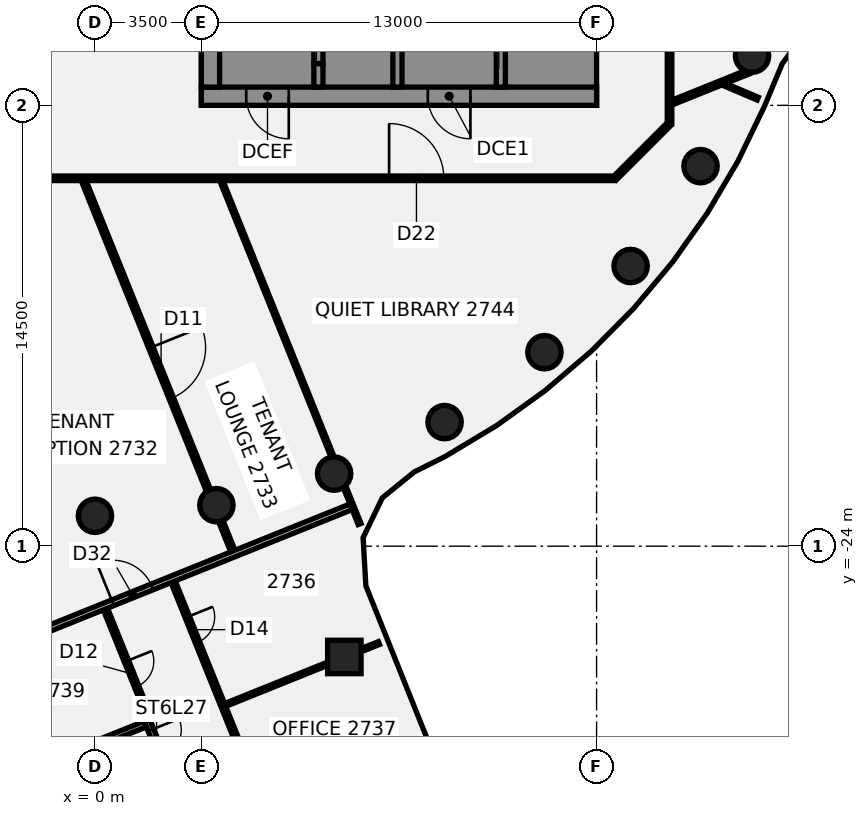
"""IFC4 building model, lengths in metres.
Left out: names, types, materials, properties, quantities, classifications, styles, units other than length and angle.
Written with IfcOpenShell. Run it as: python <this file> out.ifc"""

import sys

from ifc_helpers import new_model, si_unit, direction, frame, frame_2d, origin, origin_2d, place, context, subcontext, project, spatial, polyline, rectangle, circle, outline, extrude, element, fill, save


model = new_model("IFC4")
c1 = context("Model", 3, precision=1e-05, world=origin(), true_north=direction((0.0, 1.0)))
c2 = subcontext(c1, "Body", "Model", "MODEL_VIEW")
j1 = project(units=[si_unit("LENGTHUNIT", "METRE"), si_unit("PLANEANGLEUNIT", "RADIAN")], contexts=[c1])
p1 = place(None, origin())
s1 = spatial("IfcSite", under=j1, at=p1, CompositionType="ELEMENT")
p2 = place(p1, origin())
s2 = spatial("IfcBuilding", under=s1, at=p2, CompositionType="ELEMENT")
p3 = place(p2, frame((0.0, 0.0, 113.5)))
s3 = spatial("IfcBuildingStorey", under=s2, at=p3, CompositionType="ELEMENT", Elevation=113.5)
for number, where, z_axis, x_axis in (
    (1, (0.0, -23.0, -0.14), (0.0, 0.0, 1.0), (1.0, 0.0, 0.0)),
    (2, (3.994, -22.651, -0.14), (0.0, 0.0, 1.0), (1.0, 0.0, 0.0)),
    (3, (7.866, -21.613, -0.14), (0.0, 0.0, 1.0), (1.0, 0.0, 0.0)),
    (4, (11.5, -19.919, -0.14), (0.0, 0.0, 1.0), (1.0, 0.0, 0.0)),
    (5, (14.784, -17.619, -0.14), (0.0, 0.0, 1.0), (1.0, 0.0, 0.0)),
    (6, (17.619, -14.784, -0.14), (0.0, 0.0, 1.0), (1.0, 0.0, 0.0)),
    (7, (19.919, -11.5, -0.14), (0.0, 0.0, 1.0), (1.0, 0.0, 0.0)),
    (8, (21.613, -7.866, -0.14), (0.0, 0.0, 1.0), (1.0, 0.0, 0.0)),
):
    element("IfcColumn", number, at=place(p3, frame(where, z_axis=z_axis, x_axis=x_axis)), inside=s3, PredefinedType="COLUMN", context=c2, shape_type="SweptSolid", body=[
        extrude(circle(Radius=0.55, at=origin_2d()), origin(), (0.0, 0.0, 1.0), 3.75),
    ])
p4 = place(p3, frame((8.203, -27.644, -0.139), z_axis=(0.027071017843, 0.040085930267, 0.998829454005), x_axis=(-0.927195791465, -0.372426997279, 0.040076127407)))
e9 = element("IfcColumn", 9, at=p4, inside=s3, PredefinedType="COLUMN", context=c2, shape_type="SweptSolid", body=[
    extrude(rectangle(XDim=1.1, YDim=1.1, at=origin_2d()), origin(), (0.0, 0.0, 1.0), 3.752),
])
p5 = place(p3, frame((-0.369, -11.983, 0.0), z_axis=(0.0, 0.0, 1.0), x_axis=(0.373668275566, -0.927562407515, 0.0)))
e10 = element("IfcWall", 10, at=p5, inside=s3, PredefinedType="PARTITIONING", context=c2, shape_type="SweptSolid", body=[
    extrude(rectangle(XDim=10.973, YDim=0.15, at=frame_2d((5.486, 0.0))), origin(), (0.0, 0.0, 1.0), 3.01),
])
p6 = place(p5, frame((5.91, 0.0, 0.0)))
e11 = element("IfcOpeningElement", 11, at=p6, cuts=e10, PredefinedType="OPENING", context=c2, shape_type="SweptSolid", body=[
    extrude(rectangle(XDim=1.8, YDim=2.1, at=frame_2d((0.9, 1.05))), frame((0.0, 0.085, 0.0), z_axis=(0.0, -1.0, 0.0), x_axis=(1.0, 0.0, 0.0)), (0.0, 0.0, 1.0), 0.17),
])
p7 = place(p3, frame((4.138, -23.172, 0.0), z_axis=(0.0, 0.0, 1.0), x_axis=(0.373599900648, -0.927589949404, 0.0)))
e12 = element("IfcWall", 12, at=p7, inside=s3, PredefinedType="PARTITIONING", context=c2, shape_type="SweptSolid", body=[
    extrude(rectangle(XDim=1.066, YDim=0.15, at=frame_2d((0.533, 0.0))), origin(), (0.0, 0.0, 1.0), 3.01),
])
p8 = place(p3, frame((0.344, -26.066, 0.0), z_axis=(0.0, 0.0, 1.0), x_axis=(0.373690194782, -0.927553577064, 0.0)))
e13 = element("IfcWall", 13, at=p8, inside=s3, PredefinedType="PARTITIONING", context=c2, shape_type="SweptSolid", body=[
    extrude(rectangle(XDim=3.861, YDim=0.15, at=frame_2d((1.93, 0.0))), origin(), (0.0, 0.0, 1.0), 3.01),
])
p9 = place(p8, frame((1.85, 0.0, 0.0)))
e14 = element("IfcOpeningElement", 14, at=p9, cuts=e13, PredefinedType="OPENING", context=c2, shape_type="SweptSolid", body=[
    extrude(rectangle(XDim=0.9, YDim=2.1, at=frame_2d((0.45, 1.05))), frame((0.0, 0.085, 0.0), z_axis=(0.0, -1.0, 0.0), x_axis=(1.0, 0.0, 0.0)), (0.0, 0.0, 1.0), 0.17),
])
p10 = place(p3, frame((2.572, -25.173, 0.0), z_axis=(0.0, 0.0, 1.0), x_axis=(0.373605584832, -0.927587659999, 0.0)))
e15 = element("IfcWall", 15, at=p10, inside=s3, PredefinedType="PARTITIONING", context=c2, shape_type="SweptSolid", body=[
    extrude(rectangle(XDim=13.316, YDim=0.15, at=frame_2d((6.658, 0.0))), origin(), (0.0, 0.0, 1.0), 3.01),
])
p11 = place(p10, frame((1.245, 0.0, 0.0)))
e16 = element("IfcOpeningElement", 16, at=p11, cuts=e15, PredefinedType="OPENING", context=c2, shape_type="SweptSolid", body=[
    extrude(rectangle(XDim=0.9, YDim=2.1, at=frame_2d((0.45, 1.05))), frame((0.0, 0.085, 0.0), z_axis=(0.0, -1.0, 0.0), x_axis=(1.0, 0.0, 0.0)), (0.0, 0.0, 1.0), 0.17),
])
p12 = place(p10, frame((6.795, 0.0, 0.0)))
e17 = element("IfcOpeningElement", 17, at=p12, cuts=e15, PredefinedType="OPENING", context=c2, shape_type="SweptSolid", body=[
    extrude(rectangle(XDim=0.9, YDim=2.1, at=frame_2d((0.45, 1.05))), frame((0.0, 0.085, 0.0), z_axis=(0.0, -1.0, 0.0), x_axis=(1.0, 0.0, 0.0)), (0.0, 0.0, 1.0), 0.17),
])
p13 = place(p10, frame((10.096, 0.0, 0.0)))
e18 = element("IfcOpeningElement", 18, at=p13, cuts=e15, PredefinedType="OPENING", context=c2, shape_type="SweptSolid", body=[
    extrude(rectangle(XDim=0.9, YDim=2.1, at=frame_2d((0.45, 1.05))), frame((0.0, 0.085, 0.0), z_axis=(0.0, -1.0, 0.0), x_axis=(1.0, 0.0, 0.0)), (0.0, 0.0, 1.0), 0.17),
])
p14 = place(p3, frame((4.155, -11.974, 0.0), z_axis=(0.0, 0.0, 1.0), x_axis=(0.373614117472, -0.927584223252, 0.0)))
e19 = element("IfcWall", 19, at=p14, inside=s3, PredefinedType="PARTITIONING", context=c2, shape_type="SweptSolid", body=[
    extrude(rectangle(XDim=9.802, YDim=0.1, at=frame_2d((4.901, 0.0))), origin(), (0.0, 0.0, 1.0), 3.01),
])
p15 = place(p3, frame((8.208, -22.037, 0.0), z_axis=(0.0, 0.0, 1.0), x_axis=(0.373637172646, -0.927574936712, 0.0)))
e20 = element("IfcWall", 20, at=p15, inside=s3, PredefinedType="PARTITIONING", context=c2, shape_type="SweptSolid", body=[
    extrude(rectangle(XDim=1.33, YDim=0.1, at=frame_2d((0.665, 0.0))), origin(), (0.0, 0.0, 1.0), 3.01),
])
p16 = place(p3, frame((20.71, -8.816, 0.0), z_axis=(0.0, 0.0, 1.0), x_axis=(0.919900111119, -0.392152757944, 0.0)))
e21 = element("IfcWall", 21, at=p16, inside=s3, PredefinedType="PARTITIONING", context=c2, shape_type="SweptSolid", body=[
    extrude(rectangle(XDim=1.185, YDim=0.1, at=frame_2d((0.592, 0.0))), origin(), (0.0, 0.0, 1.0), 3.01),
])
p17 = place(p3, frame((-17.1, -11.9, 0.0), z_axis=(0.0, 0.0, 1.0), x_axis=(1.0, 0.0, 0.0)))
e22 = element("IfcWall", 22, at=p17, inside=s3, PredefinedType="PARTITIONING", context=c2, shape_type="SweptSolid", body=[
    extrude(rectangle(XDim=34.165, YDim=0.15, at=frame_2d((17.083, 0.0))), origin(), (0.0, 0.0, 1.0), 3.01),
])
p18 = place(p17, frame((12.066, 0.0, 0.0)))
e23 = element("IfcOpeningElement", 23, at=p18, cuts=e22, PredefinedType="OPENING", context=c2, shape_type="SweptSolid", body=[
    extrude(rectangle(XDim=1.8, YDim=2.1, at=frame_2d((0.9, 1.05))), frame((0.0, 0.085, 0.0), z_axis=(0.0, -1.0, 0.0), x_axis=(1.0, 0.0, 0.0)), (0.0, 0.0, 1.0), 0.17),
])
p19 = place(p17, frame((2.1, 0.0, 0.0)))
e24 = element("IfcOpeningElement", 24, at=p19, cuts=e22, PredefinedType="OPENING", context=c2, shape_type="SweptSolid", body=[
    extrude(rectangle(XDim=1.8, YDim=2.1, at=frame_2d((0.9, 1.05))), frame((0.0, 0.085, 0.0), z_axis=(0.0, -1.0, 0.0), x_axis=(1.0, 0.0, 0.0)), (0.0, 0.0, 1.0), 0.17),
])
p20 = place(p17, frame((26.775, 0.0, 0.0)))
e25 = element("IfcOpeningElement", 25, at=p20, cuts=e22, PredefinedType="OPENING", context=c2, shape_type="SweptSolid", body=[
    extrude(rectangle(XDim=1.8, YDim=2.1, at=frame_2d((0.9, 1.05))), frame((0.0, 0.085, 0.0), z_axis=(0.0, -1.0, 0.0), x_axis=(1.0, 0.0, 0.0)), (0.0, 0.0, 1.0), 0.17),
])
p21 = place(p3, frame((-4.794, -28.028, 0.0), z_axis=(0.0, 0.0, 1.0), x_axis=(0.927584222455, 0.373614119451, 0.0)))
e26 = element("IfcWall", 26, at=p21, inside=s3, PredefinedType="PARTITIONING", context=c2, shape_type="SweptSolid", body=[
    extrude(rectangle(XDim=14.249, YDim=0.2, at=frame_2d((7.124, 0.0))), origin(), (0.0, 0.0, 1.0), 3.01),
])
p22 = place(p21, frame((5.799, 0.0, 0.0)))
e27 = element("IfcOpeningElement", 27, at=p22, cuts=e26, PredefinedType="OPENING", context=c2, shape_type="SweptSolid", body=[
    extrude(rectangle(XDim=1.4, YDim=2.1, at=frame_2d((0.7, 1.05))), frame((0.0, 0.11, 0.0), z_axis=(0.0, -1.0, 0.0), x_axis=(1.0, 0.0, 0.0)), (0.0, 0.0, 1.0), 0.22),
])
p23 = place(p3, frame((4.288, -29.22, 0.0), z_axis=(0.0, 0.0, 1.0), x_axis=(0.92759458759, 0.373588384553, 0.0)))
e28 = element("IfcWall", 28, at=p23, inside=s3, PredefinedType="PARTITIONING", context=c2, shape_type="SweptSolid", body=[
    extrude(rectangle(XDim=3.637, YDim=0.1, at=frame_2d((1.819, 0.0))), origin(), (0.0, 0.0, 1.0), 3.01),
])
p24 = place(p3, frame((8.872, -27.375, 0.0), z_axis=(0.0, 0.0, 1.0), x_axis=(0.927441472032, 0.373968335497, 0.0)))
e29 = element("IfcWall", 29, at=p24, inside=s3, PredefinedType="PARTITIONING", context=c2, shape_type="SweptSolid", body=[
    extrude(rectangle(XDim=0.506, YDim=0.1, at=frame_2d((0.253, 0.0))), origin(), (0.0, 0.0, 1.0), 3.01),
])
p25 = place(p3, frame((18.983, -9.408, 0.0), z_axis=(0.0, 0.0, 1.0), x_axis=(0.927604613821, 0.373563489139, 0.0)))
e30 = element("IfcWall", 30, at=p25, inside=s3, PredefinedType="PARTITIONING", context=c2, shape_type="SweptSolid", body=[
    extrude(rectangle(XDim=2.711, YDim=0.15, at=frame_2d((1.355, 0.0))), origin(), (0.0, 0.0, 1.0), 3.01),
])
p26 = place(p3, frame((17.1, -11.9, 0.0), z_axis=(0.0, 0.0, 1.0), x_axis=(0.707106781187, 0.707106781187, 0.0)))
e31 = element("IfcWall", 31, at=p26, inside=s3, PredefinedType="PARTITIONING", context=c2, shape_type="SweptSolid", body=[
    extrude(rectangle(XDim=2.505, YDim=0.15, at=frame_2d((1.253, 0.0))), origin(), (0.0, 0.0, 1.0), 3.01),
])
p27 = place(p3, frame((18.9, -10.1, 0.0), z_axis=(0.0, 0.0, 1.0), x_axis=(0.0, 1.0, 0.0)))
e32 = element("IfcWall", 32, at=p27, inside=s3, PredefinedType="PARTITIONING", context=c2, shape_type="SweptSolid", body=[
    extrude(rectangle(XDim=20.2, YDim=0.15, at=frame_2d((10.1, 0.0))), origin(), (0.0, 0.0, 1.0), 3.01),
])
p28 = place(p27, frame((8.786, 0.0, 0.0)))
e33 = element("IfcOpeningElement", 33, at=p28, cuts=e32, PredefinedType="OPENING", context=c2, shape_type="SweptSolid", body=[
    extrude(rectangle(XDim=1.8, YDim=2.1, at=frame_2d((0.9, 1.05))), frame((0.0, 0.085, 0.0), z_axis=(0.0, -1.0, 0.0), x_axis=(1.0, 0.0, 0.0)), (0.0, 0.0, 1.0), 0.17),
])
p29 = place(p27, frame((13.717, 0.0, 0.0)))
e34 = element("IfcOpeningElement", 34, at=p29, cuts=e32, PredefinedType="OPENING", context=c2, shape_type="SweptSolid", body=[
    extrude(rectangle(XDim=0.9, YDim=2.1, at=frame_2d((0.45, 1.05))), frame((0.0, 0.085, 0.0), z_axis=(0.0, -1.0, 0.0), x_axis=(1.0, 0.0, 0.0)), (0.0, 0.0, 1.0), 0.17),
])
p30 = place(p3, frame((16.5, -9.2, 0.0), z_axis=(0.0, 0.0, 1.0), x_axis=(-1.0, 0.0, 0.0)))
e35 = element("IfcWall", 35, at=p30, inside=s3, PredefinedType="SHEAR", context=c2, shape_type="SweptSolid", body=[
    extrude(rectangle(XDim=13.0, YDim=0.6, at=frame_2d((6.5, 0.0))), origin(), (0.0, 0.0, 1.0), 3.61),
])
p31 = place(p30, frame((4.15, 0.0, 0.0)))
e36 = element("IfcOpeningElement", 36, at=p31, cuts=e35, PredefinedType="OPENING", context=c2, shape_type="SweptSolid", body=[
    extrude(rectangle(XDim=1.4, YDim=2.1, at=frame_2d((0.7, 1.05))), frame((0.0, 0.31, 0.0), z_axis=(0.0, -1.0, 0.0), x_axis=(1.0, 0.0, 0.0)), (0.0, 0.0, 1.0), 0.62),
])
p32 = place(p30, frame((10.125, 0.0, 0.0)))
e37 = element("IfcOpeningElement", 37, at=p32, cuts=e35, PredefinedType="OPENING", context=c2, shape_type="SweptSolid", body=[
    extrude(rectangle(XDim=1.4, YDim=2.1, at=frame_2d((0.7, 1.05))), frame((0.0, 0.31, 0.0), z_axis=(0.0, -1.0, 0.0), x_axis=(1.0, 0.0, 0.0)), (0.0, 0.0, 1.0), 0.62),
])
p33 = place(p3, origin())
e38 = element("IfcWall", 38, at=p33, inside=s3, PredefinedType="SHEAR", context=c2, shape_type="SweptSolid", body=[
    extrude(outline(polyline([(13.5, -8.9), (15.9, -8.9), (16.5, -8.9), (16.5, 8.9), (15.9, 8.9), (13.5, 8.9), (13.5, 8.125), (15.9, 8.125), (15.9, 5.625), (13.5, 5.625), (13.5, 5.375), (15.9, 5.375), (15.9, 2.875), (13.5, 2.875), (13.5, 2.625), (15.9, 2.625), (15.9, 0.125), (13.5, 0.125), (13.5, -0.125), (15.9, -0.125), (15.9, -2.625), (13.5, -2.625), (13.5, -2.875), (15.9, -2.875), (15.9, -5.375), (13.5, -5.375), (13.5, -5.625), (15.9, -5.625), (15.9, -8.125), (13.5, -8.125), (13.5, -8.9)])), origin(), (0.0, 0.0, 1.0), 3.61),
])
p34 = place(p3, origin())
e39 = element("IfcWall", 39, at=p34, inside=s3, PredefinedType="SHEAR", context=c2, shape_type="SweptSolid", body=[
    extrude(outline(polyline([(7.5, -8.125), (7.5, -8.9), (9.8, -8.9), (9.8, -8.125), (9.8, -5.625), (9.55, -5.625), (9.55, -8.125), (7.5, -8.125)])), origin(), (0.0, 0.0, 1.0), 3.61),
])
p35 = place(p3, frame((7.35, -8.9, 0.0), z_axis=(0.0, 0.0, 1.0), x_axis=(0.0, 1.0, 0.0)))
e40 = element("IfcWall", 40, at=p35, inside=s3, PredefinedType="SHEAR", context=c2, shape_type="SweptSolid", body=[
    extrude(rectangle(XDim=0.775, YDim=0.3, at=frame_2d((0.387, 0.0))), origin(), (0.0, 0.0, 1.0), 3.61),
])
p36 = place(p3, frame((13.35, -8.9, 0.0), z_axis=(0.0, 0.0, 1.0), x_axis=(0.0, 1.0, 0.0)))
e41 = element("IfcWall", 41, at=p36, inside=s3, PredefinedType="SHEAR", context=c2, shape_type="SweptSolid", body=[
    extrude(rectangle(XDim=17.8, YDim=0.3, at=frame_2d((8.9, 0.0))), origin(), (0.0, 0.0, 1.0), 3.61),
])
p37 = place(p36, frame((1.325, 0.0, 0.0)))
e42 = element("IfcOpeningElement", 42, at=p37, cuts=e41, PredefinedType="OPENING", context=c2, shape_type="SweptSolid", body=[
    extrude(rectangle(XDim=1.4, YDim=2.1, at=frame_2d((0.7, 1.05))), frame((0.0, 0.16, 0.0), z_axis=(0.0, -1.0, 0.0), x_axis=(1.0, 0.0, 0.0)), (0.0, 0.0, 1.0), 0.32),
])
p38 = place(p36, frame((4.225, 0.0, 0.0)))
e43 = element("IfcOpeningElement", 43, at=p38, cuts=e41, PredefinedType="OPENING", context=c2, shape_type="SweptSolid", body=[
    extrude(rectangle(XDim=1.1, YDim=2.1, at=frame_2d((0.55, 1.05))), frame((0.0, 0.16, 0.0), z_axis=(0.0, -1.0, 0.0), x_axis=(1.0, 0.0, 0.0)), (0.0, 0.0, 1.0), 0.32),
])
p39 = place(p36, frame((6.975, 0.0, 0.0)))
e44 = element("IfcOpeningElement", 44, at=p39, cuts=e41, PredefinedType="OPENING", context=c2, shape_type="SweptSolid", body=[
    extrude(rectangle(XDim=1.1, YDim=2.1, at=frame_2d((0.55, 1.05))), frame((0.0, 0.16, 0.0), z_axis=(0.0, -1.0, 0.0), x_axis=(1.0, 0.0, 0.0)), (0.0, 0.0, 1.0), 0.32),
])
p40 = place(p36, frame((9.725, 0.0, 0.0)))
e45 = element("IfcOpeningElement", 45, at=p40, cuts=e41, PredefinedType="OPENING", context=c2, shape_type="SweptSolid", body=[
    extrude(rectangle(XDim=1.1, YDim=2.1, at=frame_2d((0.55, 1.05))), frame((0.0, 0.16, 0.0), z_axis=(0.0, -1.0, 0.0), x_axis=(1.0, 0.0, 0.0)), (0.0, 0.0, 1.0), 0.32),
])
p41 = place(p36, frame((12.475, 0.0, 0.0)))
e46 = element("IfcOpeningElement", 46, at=p41, cuts=e41, PredefinedType="OPENING", context=c2, shape_type="SweptSolid", body=[
    extrude(rectangle(XDim=1.1, YDim=2.1, at=frame_2d((0.55, 1.05))), frame((0.0, 0.16, 0.0), z_axis=(0.0, -1.0, 0.0), x_axis=(1.0, 0.0, 0.0)), (0.0, 0.0, 1.0), 0.32),
])
p42 = place(p3, frame((9.95, -8.9, 0.0), z_axis=(0.0, 0.0, 1.0), x_axis=(0.0, 1.0, 0.0)))
e47 = element("IfcWall", 47, at=p42, inside=s3, PredefinedType="SHEAR", context=c2, shape_type="SweptSolid", body=[
    extrude(rectangle(XDim=17.8, YDim=0.3, at=frame_2d((8.9, 0.0))), origin(), (0.0, 0.0, 1.0), 3.61),
])
p43 = place(p3, frame((7.35, -8.125, 0.0), z_axis=(0.0, 0.0, 1.0), x_axis=(0.0, 1.0, 0.0)))
e48 = element("IfcWall", 48, at=p43, inside=s3, PredefinedType="SHEAR", context=c2, shape_type="SweptSolid", body=[
    extrude(rectangle(XDim=2.5, YDim=0.3, at=frame_2d((1.25, 0.0))), origin(), (0.0, 0.0, 1.0), 3.61),
])
p44 = place(p43, frame((0.7, 0.0, 0.0)))
e49 = element("IfcOpeningElement", 49, at=p44, cuts=e48, PredefinedType="OPENING", context=c2, shape_type="SweptSolid", body=[
    extrude(rectangle(XDim=1.1, YDim=2.1, at=frame_2d((0.55, 1.05))), frame((0.0, 0.16, 0.0), z_axis=(0.0, -1.0, 0.0), x_axis=(1.0, 0.0, 0.0)), (0.0, 0.0, 1.0), 0.32),
])
p45 = place(p3, frame((3.8, -8.9, 0.0), z_axis=(0.0, 0.0, 1.0), x_axis=(0.0, 1.0, 0.0)))
e50 = element("IfcWall", 50, at=p45, inside=s3, PredefinedType="SHEAR", context=c2, shape_type="SweptSolid", body=[
    extrude(rectangle(XDim=17.8, YDim=0.6, at=frame_2d((8.9, 0.0))), origin(), (0.0, 0.0, 1.0), 3.61),
])
p46 = place(p45, frame((1.25, 0.0, 0.0)))
e51 = element("IfcOpeningElement", 51, at=p46, cuts=e50, PredefinedType="OPENING", context=c2, shape_type="SweptSolid", body=[
    extrude(rectangle(XDim=1.8, YDim=2.1, at=frame_2d((0.9, 1.05))), frame((0.0, 0.31, 0.0), z_axis=(0.0, -1.0, 0.0), x_axis=(1.0, 0.0, 0.0)), (0.0, 0.0, 1.0), 0.62),
])
p47 = place(p45, frame((11.698, 0.0, 0.0)))
e52 = element("IfcOpeningElement", 52, at=p47, cuts=e50, PredefinedType="OPENING", context=c2, shape_type="SweptSolid", body=[
    extrude(rectangle(XDim=1.0, YDim=2.1, at=frame_2d((0.5, 1.05))), frame((0.0, 0.31, 0.0), z_axis=(0.0, -1.0, 0.0), x_axis=(1.0, 0.0, 0.0)), (0.0, 0.0, 1.0), 0.62),
])
p48 = place(p45, frame((15.222, 0.0, 0.0)))
e53 = element("IfcOpeningElement", 53, at=p48, cuts=e50, PredefinedType="OPENING", context=c2, shape_type="SweptSolid", body=[
    extrude(rectangle(XDim=1.0, YDim=2.1, at=frame_2d((0.5, 1.05))), frame((0.0, 0.31, 0.0), z_axis=(0.0, -1.0, 0.0), x_axis=(1.0, 0.0, 0.0)), (0.0, 0.0, 1.0), 0.62),
])
p49 = place(p3, frame((1.708, -29.721, -0.14), z_axis=(0.0, 0.0, 1.0), x_axis=(0.373670062359, -0.927561687704, 0.0)))
e54 = element("IfcWall", 54, at=p49, inside=s3, PredefinedType="SHEAR", context=c2, shape_type="SweptSolid", body=[
    extrude(rectangle(XDim=6.7, YDim=0.2, at=frame_2d((3.35, 0.0))), origin(), (0.0, 0.0, 1.0), 3.15),
])
p50 = place(p49, frame((0.35, 0.0, 0.0)))
e55 = element("IfcOpeningElement", 55, at=p50, cuts=e54, PredefinedType="OPENING", context=c2, shape_type="SweptSolid", body=[
    extrude(rectangle(XDim=1.0, YDim=2.1, at=frame_2d((0.5, 1.05))), frame((0.0, 0.11, 0.0), z_axis=(0.0, -1.0, 0.0), x_axis=(1.0, 0.0, 0.0)), (0.0, 0.0, 1.0), 0.22),
])
p51 = place(p3, frame((-1.315, -31.047, -0.14), z_axis=(0.0, 0.0, 1.0), x_axis=(0.927558365676, 0.373678308528, 0.0)))
e56 = element("IfcWall", 56, at=p51, inside=s3, PredefinedType="SHEAR", context=c2, shape_type="SweptSolid", body=[
    extrude(rectangle(XDim=3.2, YDim=0.2, at=frame_2d((1.6, 0.0))), origin(), (0.0, 0.0, 1.0), 3.15),
])
p52 = place(p6, origin())
e57 = element("IfcDoor", 57, at=p52, inside=s3, OperationType="DOUBLE_DOOR_SINGLE_SWING", PredefinedType="DOOR", context=c2, shape_type="SweptSolid", body=[
    extrude(rectangle(XDim=1.8, YDim=2.1, at=frame_2d((0.9, 1.05))), frame((0.0, 0.025, 0.0), z_axis=(0.0, -1.0, 0.0), x_axis=(1.0, 0.0, 0.0)), (0.0, 0.0, 1.0), 0.05),
])
fill(e11, e57)
p53 = place(p9, frame((0.9, 0.0, 0.0), z_axis=(0.0, 0.0, 1.0), x_axis=(-1.0, 0.0, 0.0)))
e58 = element("IfcDoor", 58, at=p53, inside=s3, OperationType="SINGLE_SWING_RIGHT", PredefinedType="DOOR", context=c2, shape_type="SweptSolid", body=[
    extrude(rectangle(XDim=0.9, YDim=2.1, at=frame_2d((0.45, 1.05))), frame((0.0, 0.025, 0.0), z_axis=(0.0, -1.0, 0.0), x_axis=(1.0, 0.0, 0.0)), (0.0, 0.0, 1.0), 0.05),
])
fill(e14, e58)
p54 = place(p11, origin())
e59 = element("IfcDoor", 59, at=p54, inside=s3, OperationType="SINGLE_SWING_RIGHT", PredefinedType="DOOR", context=c2, shape_type="SweptSolid", body=[
    extrude(rectangle(XDim=0.9, YDim=2.1, at=frame_2d((0.45, 1.05))), frame((0.0, 0.025, 0.0), z_axis=(0.0, -1.0, 0.0), x_axis=(1.0, 0.0, 0.0)), (0.0, 0.0, 1.0), 0.05),
])
fill(e16, e59)
p55 = place(p20, frame((1.8, 0.0, 0.0), z_axis=(0.0, 0.0, 1.0), x_axis=(-1.0, 0.0, 0.0)))
e60 = element("IfcDoor", 60, at=p55, inside=s3, OperationType="DOUBLE_DOOR_SINGLE_SWING", PredefinedType="DOOR", context=c2, shape_type="SweptSolid", body=[
    extrude(rectangle(XDim=1.8, YDim=2.1, at=frame_2d((0.9, 1.05))), frame((0.0, 0.025, 0.0), z_axis=(0.0, -1.0, 0.0), x_axis=(1.0, 0.0, 0.0)), (0.0, 0.0, 1.0), 0.05),
])
fill(e25, e60)
p56 = place(p22, origin())
e61 = element("IfcDoor", 61, at=p56, inside=s3, OperationType="DOUBLE_DOOR_SINGLE_SWING", PredefinedType="DOOR", context=c2, shape_type="SweptSolid", body=[
    extrude(rectangle(XDim=1.4, YDim=2.1, at=frame_2d((0.7, 1.05))), frame((0.0, 0.025, 0.0), z_axis=(0.0, -1.0, 0.0), x_axis=(1.0, 0.0, 0.0)), (0.0, 0.0, 1.0), 0.05),
])
fill(e27, e61)
p57 = place(p31, origin())
e62 = element("IfcDoor", 62, at=p57, inside=s3, OperationType="SINGLE_SWING_LEFT", PredefinedType="DOOR", context=c2, shape_type="SweptSolid", body=[
    extrude(rectangle(XDim=1.4, YDim=2.1, at=frame_2d((0.7, 1.05))), frame((0.0, 0.025, 0.0), z_axis=(0.0, -1.0, 0.0), x_axis=(1.0, 0.0, 0.0)), (0.0, 0.0, 1.0), 0.05),
])
fill(e36, e62)
p58 = place(p32, origin())
e63 = element("IfcDoor", 63, at=p58, inside=s3, OperationType="SINGLE_SWING_LEFT", PredefinedType="DOOR", context=c2, shape_type="SweptSolid", body=[
    extrude(rectangle(XDim=1.4, YDim=2.1, at=frame_2d((0.7, 1.05))), frame((0.0, 0.025, 0.0), z_axis=(0.0, -1.0, 0.0), x_axis=(1.0, 0.0, 0.0)), (0.0, 0.0, 1.0), 0.05),
])
fill(e37, e63)
p59 = place(p50, origin())
e64 = element("IfcDoor", 64, at=p59, inside=s3, OperationType="SINGLE_SWING_LEFT", PredefinedType="DOOR", context=c2, shape_type="SweptSolid", body=[
    extrude(rectangle(XDim=1.0, YDim=2.1, at=frame_2d((0.5, 1.05))), frame((0.0, 0.025, 0.0), z_axis=(0.0, -1.0, 0.0), x_axis=(1.0, 0.0, 0.0)), (0.0, 0.0, 1.0), 0.05),
])
fill(e55, e64)
save(model, sys.argv[1])
